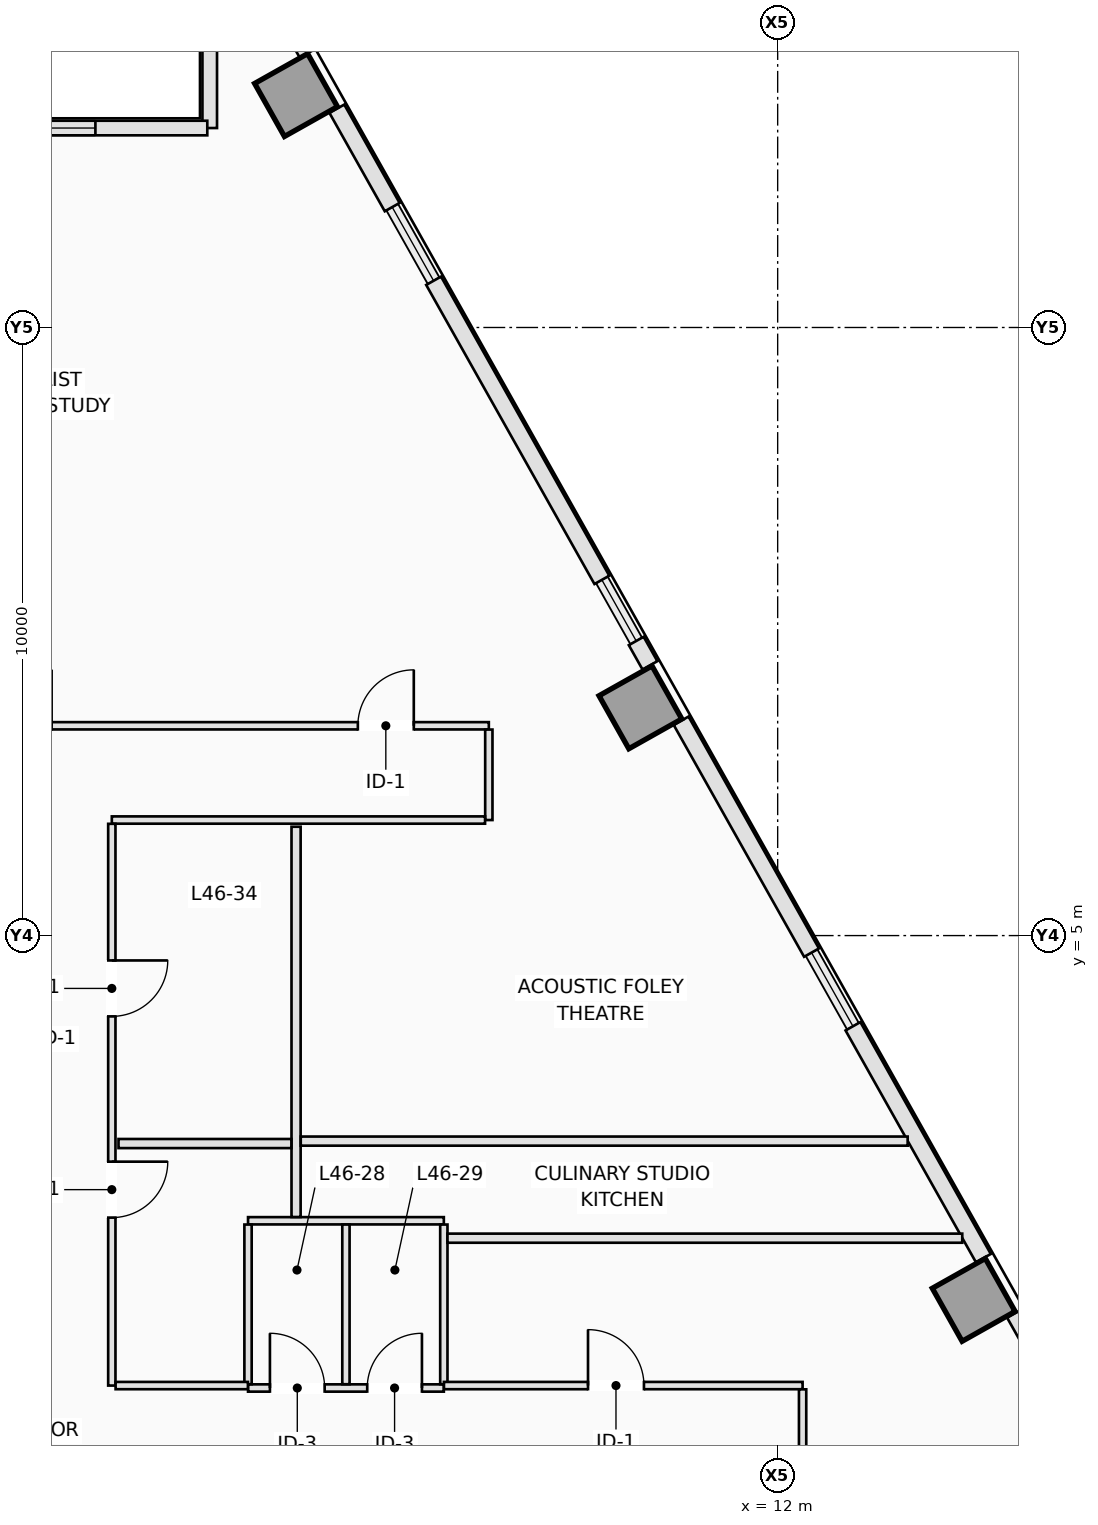
"""IFC4 building model, lengths in metres.
Left out: names, types, materials, properties, quantities, classifications, styles, units other than length and angle.
Written with IfcOpenShell. Run it as: python <this file> out.ifc"""

import sys

from ifc_helpers import new_model, si_unit, direction, frame, frame_2d, origin, origin_2d, place, context, subcontext, project, spatial, rectangle, extrude, element, fill, save


model = new_model("IFC4")
c1 = context("Model", 3, precision=1e-05, world=origin(), true_north=direction((0.0, 1.0)))
c2 = subcontext(c1, "Body", "Model", "MODEL_VIEW")
j1 = project(units=[si_unit("LENGTHUNIT", "METRE"), si_unit("PLANEANGLEUNIT", "RADIAN")], contexts=[c1])
p1 = place(None, origin())
s1 = spatial("IfcSite", under=j1, at=p1, CompositionType="ELEMENT")
p2 = place(p1, origin())
s2 = spatial("IfcBuilding", under=s1, at=p2, CompositionType="ELEMENT")
p3 = place(p2, frame((0.0, 0.0, 168.5)))
s3 = spatial("IfcBuildingStorey", under=s2, at=p3, CompositionType="ELEMENT", Elevation=168.5)
for number, where, z_axis, x_axis in (
    (1, (15.224, -0.991, 0.0), (0.0, 0.0, 1.0), (0.872, 0.49, 0.0)),
    (2, (9.743, 8.753, 0.0), (0.0, 0.0, 1.0), (0.872, 0.49, 0.0)),
    (3, (4.079, 18.822, 0.0), (0.0, 0.0, 1.0), (0.872, 0.49, 0.0)),
):
    element("IfcColumn", number, at=place(p3, frame(where, z_axis=z_axis, x_axis=x_axis)), inside=s3, PredefinedType="COLUMN", context=c2, shape_type="SweptSolid", body=[
        extrude(rectangle(XDim=1.0, YDim=1.0, at=origin_2d()), origin(), (0.0, 0.0, 1.0), 3.5),
    ])
p4 = place(p3, frame((3.792, 20.302, 0.0), z_axis=(0.0, 0.0, 1.0), x_axis=(0.490048346303, -0.871695255399, 0.0)))
e4 = element("IfcWall", 4, at=p4, inside=s3, PredefinedType="STANDARD", context=c2, shape_type="SweptSolid", body=[
    extrude(rectangle(XDim=0.926, YDim=0.24, at=frame_2d((0.463, 0.0))), origin(), (0.0, 0.0, 1.0), 3.25),
])
p5 = place(p3, frame((4.751, 18.597, 0.0), z_axis=(0.0, 0.0, 1.0), x_axis=(0.490248749158, -0.871582562899, 0.0)))
e5 = element("IfcWall", 5, at=p5, inside=s3, PredefinedType="STANDARD", context=c2, shape_type="SweptSolid", body=[
    extrude(rectangle(XDim=1.856, YDim=0.28, at=frame_2d((0.928, 0.0))), origin(), (0.0, 0.0, 1.0), 3.25),
])
p6 = place(p3, frame((6.342, 15.768, 0.0), z_axis=(0.0, 0.0, 1.0), x_axis=(0.490289995219, -0.871559361483, 0.0)))
e6 = element("IfcWall", 6, at=p6, inside=s3, PredefinedType="STANDARD", context=c2, shape_type="SweptSolid", body=[
    extrude(rectangle(XDim=5.643, YDim=0.28, at=frame_2d((2.822, 0.0))), origin(), (0.0, 0.0, 1.0), 3.25),
])
for number, where, z_axis, x_axis in (
    (7, (9.674, 9.845, 0.0), (0.0, 0.0, 1.0), (0.49, -0.871, 0.0)),
    (8, (15.896, -1.215, 0.0), (0.0, 0.0, 1.0), (0.49, -0.872, 0.0)),
):
    element("IfcWall", number, at=place(p3, frame(where, z_axis=z_axis, x_axis=x_axis)), inside=s3, PredefinedType="STANDARD", context=c2, shape_type="SweptSolid", body=[
        extrude(rectangle(XDim=0.46, YDim=0.28, at=frame_2d((0.23, 0.0))), origin(), (0.0, 0.0, 1.0), 3.25),
    ])
p7 = place(p3, frame((10.412, 8.533, 0.0), z_axis=(0.0, 0.0, 1.0), x_axis=(0.490274486291, -0.871568085747, 0.0)))
e9 = element("IfcWall", 9, at=p7, inside=s3, PredefinedType="STANDARD", context=c2, shape_type="SweptSolid", body=[
    extrude(rectangle(XDim=4.375, YDim=0.28, at=frame_2d((2.188, 0.0))), origin(), (0.0, 0.0, 1.0), 3.25),
])
p8 = place(p3, frame((13.238, 3.509, 0.0), z_axis=(0.0, 0.0, 1.0), x_axis=(0.490232095789, -0.871591929895, 0.0)))
e10 = element("IfcWall", 10, at=p8, inside=s3, PredefinedType="STANDARD", context=c2, shape_type="SweptSolid", body=[
    extrude(rectangle(XDim=4.375, YDim=0.28, at=frame_2d((2.188, 0.0))), origin(), (0.0, 0.0, 1.0), 3.25),
])
p9 = place(p3, frame((2.66, 20.24, 0.0), z_axis=(0.0, 0.0, 1.0), x_axis=(0.0, -1.0, 0.0)))
e11 = element("IfcWall", 11, at=p9, inside=s3, PredefinedType="STANDARD", context=c2, shape_type="SweptSolid", body=[
    extrude(rectangle(XDim=1.96, YDim=0.24, at=frame_2d((0.98, 0.0))), origin(), (0.0, 0.0, 1.0), 3.25),
])
p10 = place(p3, frame((2.62, 18.28, 0.0), z_axis=(0.0, 0.0, 1.0), x_axis=(-1.0, 0.0, 0.0)))
e12 = element("IfcWall", 12, at=p10, inside=s3, PredefinedType="STANDARD", context=c2, shape_type="SweptSolid", body=[
    extrude(rectangle(XDim=5.28, YDim=0.24, at=frame_2d((2.64, 0.0))), origin(), (0.0, 0.0, 1.0), 3.25),
])
p11 = place(p10, frame((1.84, 0.0, 0.9)))
e13 = element("IfcOpeningElement", 13, at=p11, cuts=e12, PredefinedType="OPENING", context=c2, shape_type="SweptSolid", body=[
    extrude(rectangle(XDim=1.6, YDim=2.1, at=frame_2d((0.8, 1.05))), frame((0.0, 0.13, 0.0), z_axis=(0.0, -1.0, 0.0), x_axis=(1.0, 0.0, 0.0)), (0.0, 0.0, 1.0), 0.26),
])
p12 = place(p3, frame((3.29, -2.44, 0.0), z_axis=(0.0, 0.0, 1.0), x_axis=(1.0, 0.0, 0.0)))
e14 = element("IfcWall", 14, at=p12, inside=s3, PredefinedType="PARTITIONING", context=c2, shape_type="SweptSolid", body=[
    extrude(rectangle(XDim=3.22, YDim=0.12, at=frame_2d((1.61, 0.0))), origin(), (0.0, 0.0, 1.0), 2.891),
])
p13 = place(p12, frame((0.36, 0.0, 0.0)))
e15 = element("IfcOpeningElement", 15, at=p13, cuts=e14, PredefinedType="OPENING", context=c2, shape_type="SweptSolid", body=[
    extrude(rectangle(XDim=0.9, YDim=2.12, at=frame_2d((0.45, 1.06))), frame((0.0, 0.07, 0.0), z_axis=(0.0, -1.0, 0.0), x_axis=(1.0, 0.0, 0.0)), (0.0, 0.0, 1.0), 0.14),
])
p14 = place(p12, frame((1.96, 0.0, 0.0)))
e16 = element("IfcOpeningElement", 16, at=p14, cuts=e14, PredefinedType="OPENING", context=c2, shape_type="SweptSolid", body=[
    extrude(rectangle(XDim=0.9, YDim=2.12, at=frame_2d((0.45, 1.06))), frame((0.0, 0.07, 0.0), z_axis=(0.0, -1.0, 0.0), x_axis=(1.0, 0.0, 0.0)), (0.0, 0.0, 1.0), 0.14),
])
p15 = place(p3, frame((3.29, 0.31, 0.0), z_axis=(0.0, 0.0, 1.0), x_axis=(1.0, 0.0, 0.0)))
e17 = element("IfcWall", 17, at=p15, inside=s3, PredefinedType="PARTITIONING", context=c2, shape_type="SweptSolid", body=[
    extrude(rectangle(XDim=3.22, YDim=0.12, at=frame_2d((1.61, 0.0))), origin(), (0.0, 0.0, 1.0), 3.25),
])
for number, where, z_axis, x_axis in (
    (18, (3.29, -2.378, 0.0), (0.0, 0.0, 1.0), (0.0, 1.0, 0.0)),
    (19, (4.9, -2.378, 0.0), (0.0, 0.0, 1.0), (0.0, 1.0, 0.0)),
    (20, (6.51, -2.378, 0.0), (0.0, 0.0, 1.0), (0.0, 1.0, 0.0)),
):
    element("IfcWall", number, at=place(p3, frame(where, z_axis=z_axis, x_axis=x_axis)), inside=s3, PredefinedType="PARTITIONING", context=c2, shape_type="SweptSolid", body=[
        extrude(rectangle(XDim=2.626, YDim=0.12, at=frame_2d((1.313, 0.0))), origin(), (0.0, 0.0, 1.0), 3.25),
    ])
p16 = place(p3, frame((-7.188, 8.45, 0.0), z_axis=(0.0, 0.0, 1.0), x_axis=(1.0, 0.0, 0.0)))
e21 = element("IfcWall", 21, at=p16, inside=s3, PredefinedType="PARTITIONING", context=c2, shape_type="SweptSolid", body=[
    extrude(rectangle(XDim=14.438, YDim=0.12, at=frame_2d((7.219, 0.0))), origin(), (0.0, 0.0, 1.0), 3.25),
])
p17 = place(p16, frame((6.328, 0.0, 0.0)))
e22 = element("IfcOpeningElement", 22, at=p17, cuts=e21, PredefinedType="OPENING", context=c2, shape_type="SweptSolid", body=[
    extrude(rectangle(XDim=0.92, YDim=2.12, at=frame_2d((0.46, 1.06))), frame((0.0, 0.07, 0.0), z_axis=(0.0, -1.0, 0.0), x_axis=(1.0, 0.0, 0.0)), (0.0, 0.0, 1.0), 0.14),
])
p18 = place(p16, frame((12.284, 0.0, 0.0)))
e23 = element("IfcOpeningElement", 23, at=p18, cuts=e21, PredefinedType="OPENING", context=c2, shape_type="SweptSolid", body=[
    extrude(rectangle(XDim=0.92, YDim=2.12, at=frame_2d((0.46, 1.06))), frame((0.0, 0.07, 0.0), z_axis=(0.0, -1.0, 0.0), x_axis=(1.0, 0.0, 0.0)), (0.0, 0.0, 1.0), 0.14),
])
p19 = place(p3, frame((7.25, 8.388, 0.0), z_axis=(0.0, 0.0, 1.0), x_axis=(0.0, -1.0, 0.0)))
e24 = element("IfcWall", 24, at=p19, inside=s3, PredefinedType="PARTITIONING", context=c2, shape_type="SweptSolid", body=[
    extrude(rectangle(XDim=1.488, YDim=0.12, at=frame_2d((0.744, 0.0))), origin(), (0.0, 0.0, 1.0), 3.25),
])
p20 = place(p3, frame((7.188, 6.9, 0.0), z_axis=(0.0, 0.0, 1.0), x_axis=(-1.0, 0.0, 0.0)))
e25 = element("IfcWall", 25, at=p20, inside=s3, PredefinedType="PARTITIONING", context=c2, shape_type="SweptSolid", body=[
    extrude(rectangle(XDim=6.138, YDim=0.12, at=frame_2d((3.069, 0.0))), origin(), (0.0, 0.0, 1.0), 2.891),
])
p21 = place(p3, frame((1.05, 6.838, 0.0), z_axis=(0.0, 0.0, 1.0), x_axis=(0.0, -1.0, 0.0)))
e26 = element("IfcWall", 26, at=p21, inside=s3, PredefinedType="PARTITIONING", context=c2, shape_type="SweptSolid", body=[
    extrude(rectangle(XDim=9.238, YDim=0.12, at=frame_2d((4.619, 0.0))), origin(), (0.0, 0.0, 1.0), 3.25),
])
p22 = place(p21, frame((2.247, 0.0, 0.0)))
e27 = element("IfcOpeningElement", 27, at=p22, cuts=e26, PredefinedType="OPENING", context=c2, shape_type="SweptSolid", body=[
    extrude(rectangle(XDim=0.92, YDim=2.12, at=frame_2d((0.46, 1.06))), frame((0.0, 0.07, 0.0), z_axis=(0.0, -1.0, 0.0), x_axis=(1.0, 0.0, 0.0)), (0.0, 0.0, 1.0), 0.14),
])
p23 = place(p21, frame((5.556, 0.0, 0.0)))
e28 = element("IfcOpeningElement", 28, at=p23, cuts=e26, PredefinedType="OPENING", context=c2, shape_type="SweptSolid", body=[
    extrude(rectangle(XDim=0.92, YDim=2.12, at=frame_2d((0.46, 1.06))), frame((0.0, 0.07, 0.0), z_axis=(0.0, -1.0, 0.0), x_axis=(1.0, 0.0, 0.0)), (0.0, 0.0, 1.0), 0.14),
])
p24 = place(p3, frame((1.112, -2.4, 0.0), z_axis=(0.0, 0.0, 1.0), x_axis=(1.0, 0.0, 0.0)))
e29 = element("IfcWall", 29, at=p24, inside=s3, PredefinedType="PARTITIONING", context=c2, shape_type="SweptSolid", body=[
    extrude(rectangle(XDim=2.176, YDim=0.12, at=frame_2d((1.088, 0.0))), origin(), (0.0, 0.0, 1.0), 2.891),
])
p25 = place(p3, frame((6.512, -2.4, 0.0), z_axis=(0.0, 0.0, 1.0), x_axis=(1.0, 0.0, 0.0)))
e30 = element("IfcWall", 30, at=p25, inside=s3, PredefinedType="PARTITIONING", context=c2, shape_type="SweptSolid", body=[
    extrude(rectangle(XDim=5.898, YDim=0.12, at=frame_2d((2.949, 0.0))), origin(), (0.0, 0.0, 1.0), 3.25),
])
p26 = place(p25, frame((2.369, 0.0, 0.0)))
e31 = element("IfcOpeningElement", 31, at=p26, cuts=e30, PredefinedType="OPENING", context=c2, shape_type="SweptSolid", body=[
    extrude(rectangle(XDim=0.92, YDim=2.12, at=frame_2d((0.46, 1.06))), frame((0.0, 0.07, 0.0), z_axis=(0.0, -1.0, 0.0), x_axis=(1.0, 0.0, 0.0)), (0.0, 0.0, 1.0), 0.14),
])
p27 = place(p3, frame((12.41, -2.462, 0.0), z_axis=(0.0, 0.0, 1.0), x_axis=(0.0, -1.0, 0.0)))
e32 = element("IfcWall", 32, at=p27, inside=s3, PredefinedType="PARTITIONING", context=c2, shape_type="SweptSolid", body=[
    extrude(rectangle(XDim=1.786, YDim=0.12, at=frame_2d((0.893, 0.0))), origin(), (0.0, 0.0, 1.0), 3.25),
])
p28 = place(p3, frame((4.08, 0.372, 0.0), z_axis=(0.0, 0.0, 1.0), x_axis=(0.0, 1.0, 0.0)))
e33 = element("IfcWall", 33, at=p28, inside=s3, PredefinedType="PARTITIONING", context=c2, shape_type="SweptSolid", body=[
    extrude(rectangle(XDim=6.418, YDim=0.15, at=frame_2d((3.209, 0.0))), origin(), (0.0, 0.0, 1.0), 2.717),
])
p29 = place(p3, frame((14.138, 1.62, 0.0), z_axis=(0.0, 0.0, 1.0), x_axis=(-1.0, 0.0, 0.0)))
e34 = element("IfcWall", 34, at=p29, inside=s3, PredefinedType="PARTITIONING", context=c2, shape_type="SweptSolid", body=[
    extrude(rectangle(XDim=9.981, YDim=0.15, at=frame_2d((4.99, 0.0))), origin(), (0.0, 0.0, 1.0), 3.25),
])
p30 = place(p3, frame((4.003, 1.58, 0.0), z_axis=(0.0, 0.0, 1.0), x_axis=(-1.0, 0.0, 0.0)))
e35 = element("IfcWall", 35, at=p30, inside=s3, PredefinedType="PARTITIONING", context=c2, shape_type="SweptSolid", body=[
    extrude(rectangle(XDim=2.843, YDim=0.15, at=frame_2d((1.421, 0.0))), origin(), (0.0, 0.0, 1.0), 3.25),
])
p31 = place(p3, frame((15.035, 0.024, 0.0), z_axis=(0.0, 0.0, 1.0), x_axis=(-1.0, 0.0, 0.0)))
e36 = element("IfcWall", 36, at=p31, inside=s3, PredefinedType="PARTITIONING", context=c2, shape_type="SweptSolid", body=[
    extrude(rectangle(XDim=8.465, YDim=0.15, at=frame_2d((4.233, 0.0))), origin(), (0.0, 0.0, 1.0), 3.25),
])
p32 = place(p11, origin())
e37 = element("IfcWindow", 37, at=p32, inside=s3, PartitioningType="SINGLE_PANEL", PredefinedType="WINDOW", context=c2, shape_type="SweptSolid", body=[
    extrude(rectangle(XDim=1.6, YDim=2.1, at=frame_2d((0.8, 1.05))), frame((0.0, 0.03, 0.0), z_axis=(0.0, -1.0, 0.0), x_axis=(1.0, 0.0, 0.0)), (0.0, 0.0, 1.0), 0.06),
])
fill(e13, e37)
p33 = place(p13, origin())
e38 = element("IfcDoor", 38, at=p33, inside=s3, OperationType="SINGLE_SWING_LEFT", PredefinedType="DOOR", context=c2, shape_type="SweptSolid", body=[
    extrude(rectangle(XDim=0.9, YDim=2.12, at=frame_2d((0.45, 1.06))), frame((0.0, 0.025, 0.0), z_axis=(0.0, -1.0, 0.0), x_axis=(1.0, 0.0, 0.0)), (0.0, 0.0, 1.0), 0.05),
])
fill(e15, e38)
p34 = place(p14, origin())
e39 = element("IfcDoor", 39, at=p34, inside=s3, OperationType="SINGLE_SWING_RIGHT", PredefinedType="DOOR", context=c2, shape_type="SweptSolid", body=[
    extrude(rectangle(XDim=0.9, YDim=2.12, at=frame_2d((0.45, 1.06))), frame((0.0, 0.025, 0.0), z_axis=(0.0, -1.0, 0.0), x_axis=(1.0, 0.0, 0.0)), (0.0, 0.0, 1.0), 0.05),
])
fill(e16, e39)
p35 = place(p18, origin())
e40 = element("IfcDoor", 40, at=p35, inside=s3, OperationType="SINGLE_SWING_RIGHT", PredefinedType="DOOR", context=c2, shape_type="SweptSolid", body=[
    extrude(rectangle(XDim=0.92, YDim=2.12, at=frame_2d((0.46, 1.06))), frame((0.0, 0.025, 0.0), z_axis=(0.0, -1.0, 0.0), x_axis=(1.0, 0.0, 0.0)), (0.0, 0.0, 1.0), 0.05),
])
fill(e23, e40)
p36 = place(p22, origin())
e41 = element("IfcDoor", 41, at=p36, inside=s3, OperationType="SINGLE_SWING_LEFT", PredefinedType="DOOR", context=c2, shape_type="SweptSolid", body=[
    extrude(rectangle(XDim=0.92, YDim=2.12, at=frame_2d((0.46, 1.06))), frame((0.0, 0.025, 0.0), z_axis=(0.0, -1.0, 0.0), x_axis=(1.0, 0.0, 0.0)), (0.0, 0.0, 1.0), 0.05),
])
fill(e27, e41)
p37 = place(p23, origin())
e42 = element("IfcDoor", 42, at=p37, inside=s3, OperationType="SINGLE_SWING_LEFT", PredefinedType="DOOR", context=c2, shape_type="SweptSolid", body=[
    extrude(rectangle(XDim=0.92, YDim=2.12, at=frame_2d((0.46, 1.06))), frame((0.0, 0.025, 0.0), z_axis=(0.0, -1.0, 0.0), x_axis=(1.0, 0.0, 0.0)), (0.0, 0.0, 1.0), 0.05),
])
fill(e28, e42)
p38 = place(p26, origin())
e43 = element("IfcDoor", 43, at=p38, inside=s3, OperationType="SINGLE_SWING_LEFT", PredefinedType="DOOR", context=c2, shape_type="SweptSolid", body=[
    extrude(rectangle(XDim=0.92, YDim=2.12, at=frame_2d((0.46, 1.06))), frame((0.0, 0.025, 0.0), z_axis=(0.0, -1.0, 0.0), x_axis=(1.0, 0.0, 0.0)), (0.0, 0.0, 1.0), 0.05),
])
fill(e31, e43)
save(model, sys.argv[1])
